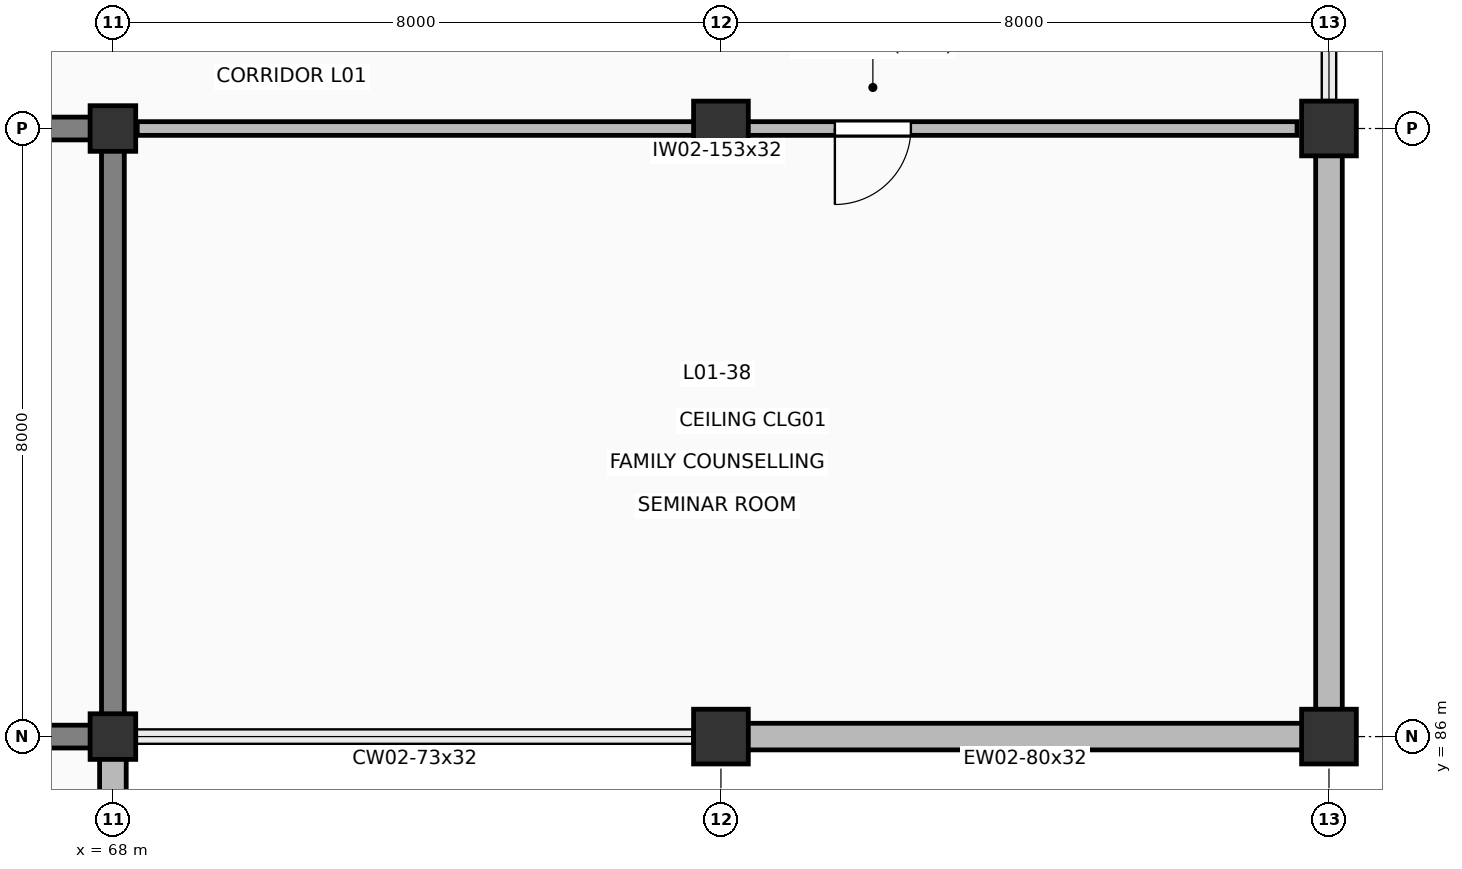
"""IFC4 building model, lengths in metres.
Left out: names, types, materials, properties, quantities, classifications, styles, units other than length and angle.
Written with IfcOpenShell. Run it as: python <this file> out.ifc"""

import sys

from ifc_helpers import new_model, si_unit, direction, frame, frame_2d, origin, origin_2d, place, context, subcontext, project, spatial, rectangle, circle, extrude, element, fill, save


model = new_model("IFC4")
c1 = context("Model", 3, precision=1e-05, world=origin(), true_north=direction((0.0, 1.0)))
c2 = subcontext(c1, "Body", "Model", "MODEL_VIEW")
j1 = project(units=[si_unit("LENGTHUNIT", "METRE"), si_unit("PLANEANGLEUNIT", "RADIAN")], contexts=[c1])
p1 = place(None, origin())
s1 = spatial("IfcSite", under=j1, at=p1, CompositionType="ELEMENT")
p2 = place(p1, origin())
s2 = spatial("IfcBuilding", under=s1, at=p2, CompositionType="ELEMENT")
p3 = place(p2, frame((0.0, 0.0, 5.4)))
s3 = spatial("IfcBuildingStorey", under=s2, at=p3, CompositionType="ELEMENT", Elevation=5.4)
for number, where, z_axis, x_axis in (
    (1, (68.0, 86.0, 0.0), (0.0, 0.0, 1.0), (1.0, 0.0, 0.0)),
    (2, (68.0, 94.0, 0.0), (0.0, 0.0, 1.0), (1.0, 0.0, 0.0)),
):
    element("IfcColumn", number, at=place(p3, frame(where, z_axis=z_axis, x_axis=x_axis)), inside=s3, PredefinedType="COLUMN", context=c2, shape_type="SweptSolid", body=[
        extrude(rectangle(XDim=0.6, YDim=0.6, at=origin_2d()), origin(), (0.0, 0.0, 1.0), 4.2),
    ])
for number, where, z_axis, x_axis in (
    (3, (76.0, 86.0, 0.0), (0.0, 0.0, 1.0), (1.0, 0.0, 0.0)),
    (4, (76.0, 94.0, 0.0), (0.0, 0.0, 1.0), (1.0, 0.0, 0.0)),
    (5, (84.0, 86.0, 0.0), (0.0, 0.0, 1.0), (1.0, 0.0, 0.0)),
    (6, (84.0, 94.0, 0.0), (0.0, 0.0, 1.0), (1.0, 0.0, 0.0)),
):
    element("IfcColumn", number, at=place(p3, frame(where, z_axis=z_axis, x_axis=x_axis)), inside=s3, PredefinedType="COLUMN", context=c2, shape_type="SweptSolid", body=[
        extrude(circle(Radius=0.36, at=origin_2d()), origin(), (0.0, 0.0, 1.0), 4.2),
    ])
p4 = place(p3, frame((84.0, 94.0, 0.0), z_axis=(0.0, 0.0, 1.0), x_axis=(0.0, -1.0, 0.0)))
e7 = element("IfcWall", 7, at=p4, inside=s3, PredefinedType="SOLIDWALL", context=c2, shape_type="SweptSolid", body=[
    extrude(rectangle(XDim=8.0, YDim=0.35, at=frame_2d((4.0, 0.0))), origin(), (0.0, 0.0, 1.0), 3.225),
])
p5 = place(p3, frame((84.0, 86.0, 0.0), z_axis=(0.0, 0.0, 1.0), x_axis=(-1.0, 0.0, 0.0)))
e8 = element("IfcWall", 8, at=p5, inside=s3, PredefinedType="SOLIDWALL", context=c2, shape_type="SweptSolid", body=[
    extrude(rectangle(XDim=8.0, YDim=0.35, at=frame_2d((4.0, 0.0))), origin(), (0.0, 0.0, 1.0), 3.165),
])
p6 = place(p3, frame((68.0, 86.0, 0.0), z_axis=(0.0, 0.0, 1.0), x_axis=(-1.0, 0.0, 0.0)))
e9 = element("IfcWall", 9, at=p6, inside=s3, PredefinedType="SOLIDWALL", context=c2, shape_type="SweptSolid", body=[
    extrude(rectangle(XDim=8.0, YDim=0.3, at=frame_2d((4.0, 0.0))), origin(), (0.0, 0.0, 1.0), 4.2),
])
p7 = place(p3, frame((68.0, 86.0, 0.0), z_axis=(0.0, 0.0, 1.0), x_axis=(0.0, -1.0, 0.0)))
e10 = element("IfcWall", 10, at=p7, inside=s3, PredefinedType="SOLIDWALL", context=c2, shape_type="SweptSolid", body=[
    extrude(rectangle(XDim=8.0, YDim=0.35, at=frame_2d((4.0, 0.0))), origin(), (0.0, 0.0, 1.0), 3.225),
])
p8 = place(p3, frame((60.0, 94.0, 0.0), z_axis=(0.0, 0.0, 1.0), x_axis=(1.0, 0.0, 0.0)))
e11 = element("IfcWall", 11, at=p8, inside=s3, PredefinedType="SHEAR", context=c2, shape_type="SweptSolid", body=[
    extrude(rectangle(XDim=8.0, YDim=0.3, at=frame_2d((4.0, 0.0))), origin(), (0.0, 0.0, 1.0), 4.2),
])
p9 = place(p8, frame((1.65, 0.0, 0.0)))
e12 = element("IfcOpeningElement", 12, at=p9, cuts=e11, PredefinedType="OPENING", context=c2, shape_type="SweptSolid", body=[
    extrude(rectangle(XDim=1.1, YDim=2.2, at=frame_2d((0.55, 1.1))), frame((0.0, 0.16, 0.0), z_axis=(0.0, -1.0, 0.0), x_axis=(1.0, 0.0, 0.0)), (0.0, 0.0, 1.0), 0.32),
])
p10 = place(p3, frame((68.0, 94.0, 0.0), z_axis=(0.0, 0.0, 1.0), x_axis=(0.0, -1.0, 0.0)))
e13 = element("IfcWall", 13, at=p10, inside=s3, PredefinedType="SHEAR", context=c2, shape_type="SweptSolid", body=[
    extrude(rectangle(XDim=8.0, YDim=0.3, at=frame_2d((4.0, 0.0))), origin(), (0.0, 0.0, 1.0), 4.2),
])
p11 = place(p3, frame((83.58, 94.0, 0.0), z_axis=(0.0, 0.0, 1.0), x_axis=(-1.0, 0.0, 0.0)))
e14 = element("IfcWall", 14, at=p11, inside=s3, PredefinedType="PARTITIONING", context=c2, shape_type="SweptSolid", body=[
    extrude(rectangle(XDim=15.26, YDim=0.18, at=frame_2d((7.63, 0.0))), origin(), (0.0, 0.0, 1.0), 3.165),
])
p12 = place(p11, frame((5.081, 0.0, 0.0)))
e15 = element("IfcOpeningElement", 15, at=p12, cuts=e14, PredefinedType="OPENING", context=c2, shape_type="SweptSolid", body=[
    extrude(rectangle(XDim=1.0, YDim=2.15, at=frame_2d((0.5, 1.075))), frame((0.0, 0.1, 0.0), z_axis=(0.0, -1.0, 0.0), x_axis=(1.0, 0.0, 0.0)), (0.0, 0.0, 1.0), 0.2),
])
p13 = place(p12, origin())
e16 = element("IfcDoor", 16, at=p13, inside=s3, OperationType="SINGLE_SWING_RIGHT", PredefinedType="DOOR", context=c2, shape_type="SweptSolid", body=[
    extrude(rectangle(XDim=1.0, YDim=2.15, at=frame_2d((0.5, 1.075))), frame((0.0, 0.025, 0.0), z_axis=(0.0, -1.0, 0.0), x_axis=(1.0, 0.0, 0.0)), (0.0, 0.0, 1.0), 0.05),
])
fill(e15, e16)
save(model, sys.argv[1])
